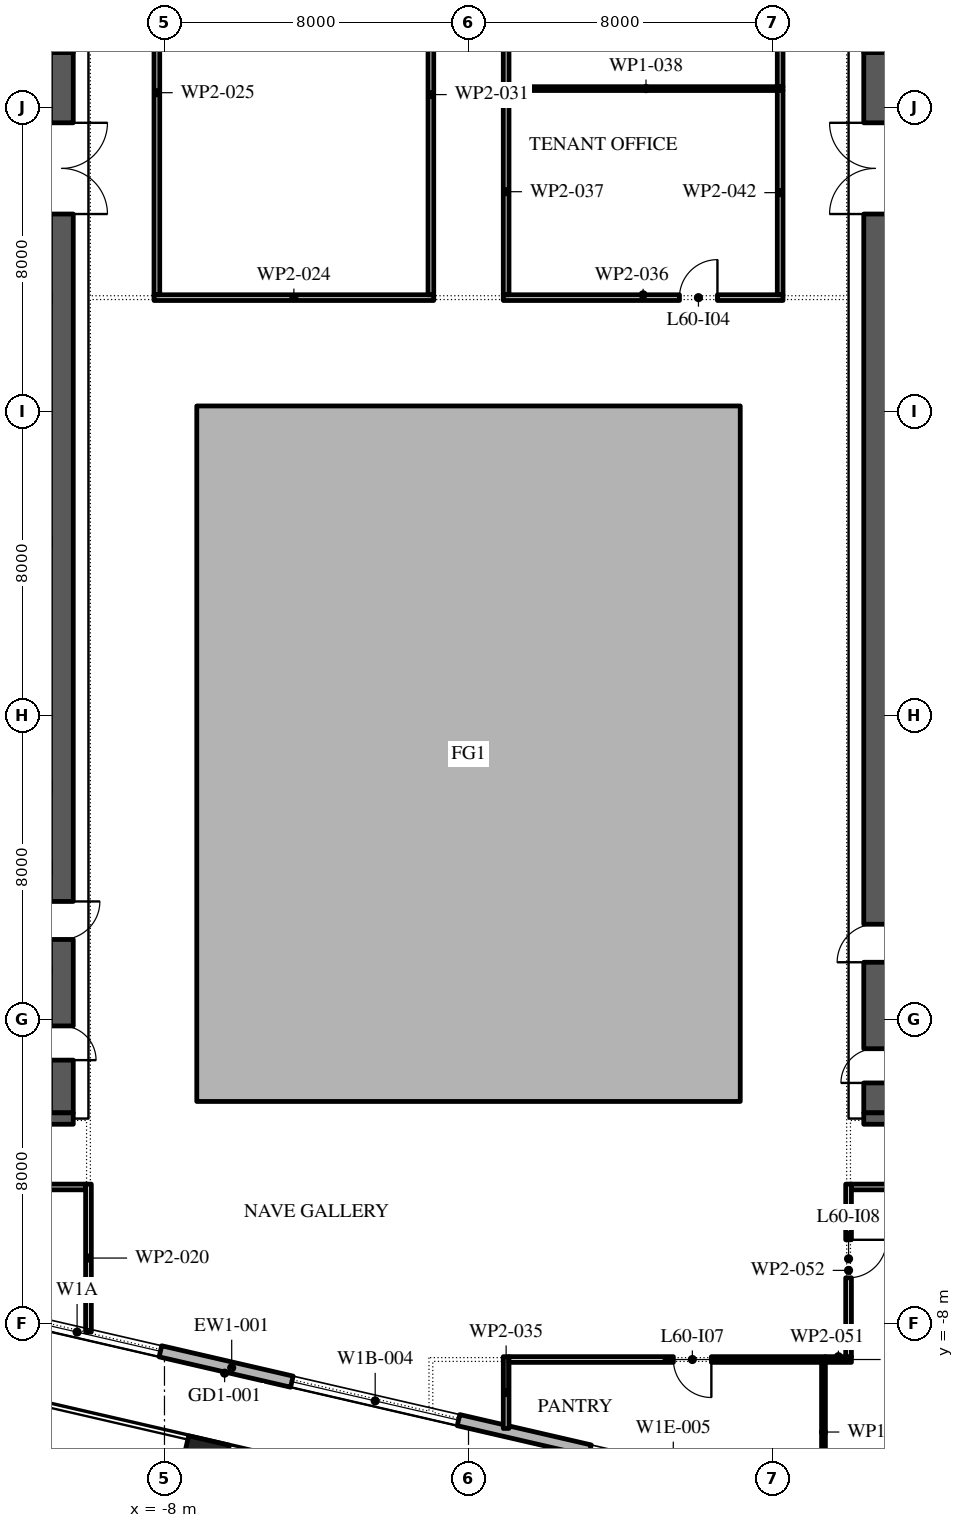
"""IFC4 building model, lengths in metres.
Left out: names, types, materials, properties, quantities, classifications, styles, units other than length and angle.
Written with IfcOpenShell. Run it as: python <this file> out.ifc"""

import sys

from ifc_helpers import new_model, si_unit, direction, frame, frame_2d, origin, origin_2d, place, context, subcontext, project, spatial, polyline, rectangle, outline, extrude, element, fill, save


model = new_model("IFC4")
c1 = context("Model", 3, precision=1e-05, world=origin(), true_north=direction((0.0, 1.0)))
c2 = subcontext(c1, "Body", "Model", "MODEL_VIEW")
j1 = project(units=[si_unit("LENGTHUNIT", "METRE"), si_unit("PLANEANGLEUNIT", "RADIAN")], contexts=[c1])
p1 = place(None, origin())
s1 = spatial("IfcSite", under=j1, at=p1, CompositionType="ELEMENT")
p2 = place(p1, origin())
s2 = spatial("IfcBuilding", under=s1, at=p2, CompositionType="ELEMENT")
p3 = place(p2, frame((0.0, 0.0, 276.6)))
s3 = spatial("IfcBuildingStorey", under=s2, at=p3, CompositionType="ELEMENT", Elevation=276.6)
p4 = place(p3, frame((-6.951, -11.608, 0.0), z_axis=(0.0, 0.0, 1.0), x_axis=(0.974370064785, -0.224951054344, 0.0)))
e1 = element("IfcColumn", 1, at=p4, inside=s3, PredefinedType="COLUMN", context=c2, shape_type="SweptSolid", body=[
    extrude(rectangle(XDim=1.1, YDim=1.1, at=origin_2d()), origin(), (0.0, 0.0, 1.0), 4.2),
])
p5 = place(p3, origin())
e2 = element("IfcWall", 2, at=p5, inside=s3, PredefinedType="STANDARD", context=c2, shape_type="SweptSolid", body=[
    extrude(outline(polyline([(-7.15, -2.15), (7.15, -2.15), (7.15, 16.15), (-7.15, 16.15), (-7.15, -2.15)]), holes=[polyline([(-7.0, -2.0), (-7.0, 16.0), (7.0, 16.0), (7.0, -2.0), (-7.0, -2.0)])]), origin(), (0.0, 0.0, 1.0), 4.0),
])
p6 = place(p3, frame((-29.616, -3.758, 0.0), z_axis=(0.0, 0.0, 1.0), x_axis=(0.974370532314, -0.224949029246, 0.0)))
e3 = element("IfcWall", 3, at=p6, inside=s3, PredefinedType="STANDARD", context=c2, shape_type="SweptSolid", body=[
    extrude(rectangle(XDim=48.0, YDim=0.3, at=frame_2d((24.0, 0.0))), origin(), (0.0, 0.0, 1.0), 4.0),
])
p7 = place(p6, frame((1.625, 0.0, 0.45)))
e4 = element("IfcOpeningElement", 4, at=p7, cuts=e3, PredefinedType="OPENING", context=c2, shape_type="SweptSolid", body=[
    extrude(rectangle(XDim=4.5, YDim=3.05, at=frame_2d((2.25, 1.525))), frame((0.0, 0.16, 0.0), z_axis=(0.0, -1.0, 0.0), x_axis=(1.0, 0.0, 0.0)), (0.0, 0.0, 1.0), 0.32),
])
p8 = place(p6, frame((10.575, 0.0, 0.0)))
e5 = element("IfcOpeningElement", 5, at=p8, cuts=e3, PredefinedType="OPENING", context=c2, shape_type="SweptSolid", body=[
    extrude(rectangle(XDim=2.4, YDim=3.5, at=frame_2d((1.2, 1.75))), frame((0.0, 0.16, 0.0), z_axis=(0.0, -1.0, 0.0), x_axis=(1.0, 0.0, 0.0)), (0.0, 0.0, 1.0), 0.32),
])
p9 = place(p6, frame((17.575, 0.0, 0.45)))
e6 = element("IfcOpeningElement", 6, at=p9, cuts=e3, PredefinedType="OPENING", context=c2, shape_type="SweptSolid", body=[
    extrude(rectangle(XDim=4.5, YDim=3.0, at=frame_2d((2.25, 1.5))), frame((0.0, 0.16, 0.0), z_axis=(0.0, -1.0, 0.0), x_axis=(1.0, 0.0, 0.0)), (0.0, 0.0, 1.0), 0.32),
])
p10 = place(p6, frame((25.625, 0.0, 0.45)))
e7 = element("IfcOpeningElement", 7, at=p10, cuts=e3, PredefinedType="OPENING", context=c2, shape_type="SweptSolid", body=[
    extrude(rectangle(XDim=4.5, YDim=2.95, at=frame_2d((2.25, 1.475))), frame((0.0, 0.16, 0.0), z_axis=(0.0, -1.0, 0.0), x_axis=(1.0, 0.0, 0.0)), (0.0, 0.0, 1.0), 0.32),
])
p11 = place(p6, frame((33.675, 0.0, 0.45)))
e8 = element("IfcOpeningElement", 8, at=p11, cuts=e3, PredefinedType="OPENING", context=c2, shape_type="SweptSolid", body=[
    extrude(rectangle(XDim=4.5, YDim=2.825, at=frame_2d((2.25, 1.413))), frame((0.0, 0.16, 0.0), z_axis=(0.0, -1.0, 0.0), x_axis=(1.0, 0.0, 0.0)), (0.0, 0.0, 1.0), 0.32),
])
p12 = place(p6, frame((42.175, 0.0, 0.0)))
e9 = element("IfcOpeningElement", 9, at=p12, cuts=e3, PredefinedType="OPENING", context=c2, shape_type="SweptSolid", body=[
    extrude(rectangle(XDim=2.4, YDim=3.5, at=frame_2d((1.2, 1.75))), frame((0.0, 0.16, 0.0), z_axis=(0.0, -1.0, 0.0), x_axis=(1.0, 0.0, 0.0)), (0.0, 0.0, 1.0), 0.32),
])
p13 = place(p3, frame((-10.7, -2.45, 0.0), z_axis=(0.0, 0.0, 1.0), x_axis=(0.0, 1.0, 0.0)))
e10 = element("IfcWall", 10, at=p13, inside=s3, PredefinedType="SHEAR", context=c2, shape_type="SweptSolid", body=[
    extrude(rectangle(XDim=27.9, YDim=0.6, at=frame_2d((13.95, 0.0))), origin(), (0.0, 0.0, 1.0), 4.0),
])
p14 = place(p13, frame((23.65, 0.0, 0.0)))
e11 = element("IfcOpeningElement", 11, at=p14, cuts=e10, PredefinedType="OPENING", context=c2, shape_type="SweptSolid", body=[
    extrude(rectangle(XDim=2.4, YDim=2.1, at=frame_2d((1.2, 1.05))), frame((0.0, 0.31, 0.0), z_axis=(0.0, -1.0, 0.0), x_axis=(1.0, 0.0, 0.0)), (0.0, 0.0, 1.0), 0.62),
])
p15 = place(p13, frame((1.387, 0.0, 0.0)))
e12 = element("IfcOpeningElement", 12, at=p15, cuts=e10, PredefinedType="OPENING", context=c2, shape_type="SweptSolid", body=[
    extrude(rectangle(XDim=0.9, YDim=2.1, at=frame_2d((0.45, 1.05))), frame((0.0, 0.31, 0.0), z_axis=(0.0, -1.0, 0.0), x_axis=(1.0, 0.0, 0.0)), (0.0, 0.0, 1.0), 0.62),
])
p16 = place(p13, frame((4.562, 0.0, 0.0)))
e13 = element("IfcOpeningElement", 13, at=p16, cuts=e10, PredefinedType="OPENING", context=c2, shape_type="SweptSolid", body=[
    extrude(rectangle(XDim=1.0, YDim=2.1, at=frame_2d((0.5, 1.05))), frame((0.0, 0.31, 0.0), z_axis=(0.0, -1.0, 0.0), x_axis=(1.0, 0.0, 0.0)), (0.0, 0.0, 1.0), 0.62),
])
p17 = place(p3, frame((-21.6, -2.6, 0.0), z_axis=(0.0, 0.0, 1.0), x_axis=(1.0, 0.0, 0.0)))
e14 = element("IfcWall", 14, at=p17, inside=s3, PredefinedType="SHEAR", context=c2, shape_type="SweptSolid", body=[
    extrude(rectangle(XDim=11.2, YDim=0.3, at=frame_2d((5.6, 0.0))), origin(), (0.0, 0.0, 1.0), 4.0),
])
p18 = place(p3, frame((10.7, -2.45, 0.0), z_axis=(0.0, 0.0, 1.0), x_axis=(0.0, 1.0, 0.0)))
e15 = element("IfcWall", 15, at=p18, inside=s3, PredefinedType="SHEAR", context=c2, shape_type="SweptSolid", body=[
    extrude(rectangle(XDim=27.9, YDim=0.6, at=frame_2d((13.95, 0.0))), origin(), (0.0, 0.0, 1.0), 4.0),
])
p19 = place(p18, frame((23.65, 0.0, 0.0)))
e16 = element("IfcOpeningElement", 16, at=p19, cuts=e15, PredefinedType="OPENING", context=c2, shape_type="SweptSolid", body=[
    extrude(rectangle(XDim=2.4, YDim=2.1, at=frame_2d((1.2, 1.05))), frame((0.0, 0.31, 0.0), z_axis=(0.0, -1.0, 0.0), x_axis=(1.0, 0.0, 0.0)), (0.0, 0.0, 1.0), 0.62),
])
p20 = place(p18, frame((0.788, 0.0, 0.0)))
e17 = element("IfcOpeningElement", 17, at=p20, cuts=e15, PredefinedType="OPENING", context=c2, shape_type="SweptSolid", body=[
    extrude(rectangle(XDim=0.9, YDim=2.1, at=frame_2d((0.45, 1.05))), frame((0.0, 0.31, 0.0), z_axis=(0.0, -1.0, 0.0), x_axis=(1.0, 0.0, 0.0)), (0.0, 0.0, 1.0), 0.62),
])
p21 = place(p18, frame((3.962, 0.0, 0.0)))
e18 = element("IfcOpeningElement", 18, at=p21, cuts=e15, PredefinedType="OPENING", context=c2, shape_type="SweptSolid", body=[
    extrude(rectangle(XDim=1.0, YDim=2.1, at=frame_2d((0.5, 1.05))), frame((0.0, 0.31, 0.0), z_axis=(0.0, -1.0, 0.0), x_axis=(1.0, 0.0, 0.0)), (0.0, 0.0, 1.0), 0.62),
])
p22 = place(p3, frame((10.4, -2.6, 0.0), z_axis=(0.0, 0.0, 1.0), x_axis=(1.0, 0.0, 0.0)))
e19 = element("IfcWall", 19, at=p22, inside=s3, PredefinedType="SHEAR", context=c2, shape_type="SweptSolid", body=[
    extrude(rectangle(XDim=11.2, YDim=0.3, at=frame_2d((5.6, 0.0))), origin(), (0.0, 0.0, 1.0), 4.0),
])
p23 = place(p3, frame((-10.0, -8.216, 0.0), z_axis=(0.0, 0.0, 1.0), x_axis=(0.0, 1.0, 0.0)))
e20 = element("IfcWall", 20, at=p23, inside=s3, PredefinedType="PARTITIONING", context=c2, shape_type="SweptSolid", body=[
    extrude(rectangle(XDim=3.891, YDim=0.15, at=frame_2d((1.946, 0.0))), origin(), (0.0, 0.0, 1.0), 4.0),
])
p24 = place(p3, frame((-10.075, -4.4, 0.0), z_axis=(0.0, 0.0, 1.0), x_axis=(-1.0, 0.0, 0.0)))
e21 = element("IfcWall", 21, at=p24, inside=s3, PredefinedType="PARTITIONING", context=c2, shape_type="SweptSolid", body=[
    extrude(rectangle(XDim=13.64, YDim=0.15, at=frame_2d((6.82, 0.0))), origin(), (0.0, 0.0, 1.0), 4.0),
])
p25 = place(p24, frame((9.065, 0.0, 0.0)))
e22 = element("IfcOpeningElement", 22, at=p25, cuts=e21, PredefinedType="OPENING", context=c2, shape_type="SweptSolid", body=[
    extrude(rectangle(XDim=1.0, YDim=2.1, at=frame_2d((0.5, 1.05))), frame((0.0, 0.085, 0.0), z_axis=(0.0, -1.0, 0.0), x_axis=(1.0, 0.0, 0.0)), (0.0, 0.0, 1.0), 0.17),
])
p26 = place(p3, frame((-8.275, 19.0, 0.0), z_axis=(0.0, 0.0, 1.0), x_axis=(1.0, 0.0, 0.0)))
e23 = element("IfcWall", 23, at=p26, inside=s3, PredefinedType="PARTITIONING", context=c2, shape_type="SweptSolid", body=[
    extrude(rectangle(XDim=7.36, YDim=0.15, at=frame_2d((3.68, 0.0))), origin(), (0.0, 0.0, 1.0), 4.0),
])
p27 = place(p3, frame((-8.2, 29.71, 0.0), z_axis=(0.0, 0.0, 1.0), x_axis=(0.0, -1.0, 0.0)))
e24 = element("IfcWall", 24, at=p27, inside=s3, PredefinedType="PARTITIONING", context=c2, shape_type="SweptSolid", body=[
    extrude(rectangle(XDim=10.635, YDim=0.15, at=frame_2d((5.317, 0.0))), origin(), (0.0, 0.0, 1.0), 4.0),
])
p28 = place(p27, frame((2.81, 0.0, 0.0)))
e25 = element("IfcOpeningElement", 25, at=p28, cuts=e24, PredefinedType="OPENING", context=c2, shape_type="SweptSolid", body=[
    extrude(rectangle(XDim=1.0, YDim=2.1, at=frame_2d((0.5, 1.05))), frame((0.0, 0.085, 0.0), z_axis=(0.0, -1.0, 0.0), x_axis=(1.0, 0.0, 0.0)), (0.0, 0.0, 1.0), 0.17),
])
p29 = place(p3, frame((-0.99, 19.075, 0.0), z_axis=(0.0, 0.0, 1.0), x_axis=(0.0, 1.0, 0.0)))
e26 = element("IfcWall", 26, at=p29, inside=s3, PredefinedType="PARTITIONING", context=c2, shape_type="SweptSolid", body=[
    extrude(rectangle(XDim=10.535, YDim=0.15, at=frame_2d((5.268, 0.0))), origin(), (0.0, 0.0, 1.0), 4.0),
])
p30 = place(p3, frame((0.99, -8.865, 0.0), z_axis=(0.0, 0.0, 1.0), x_axis=(0.0, -1.0, 0.0)))
e27 = element("IfcWall", 27, at=p30, inside=s3, PredefinedType="PARTITIONING", context=c2, shape_type="SweptSolid", body=[
    extrude(rectangle(XDim=1.888, YDim=0.15, at=frame_2d((0.944, 0.0))), origin(), (0.0, 0.0, 1.0), 4.0),
])
p31 = place(p3, frame((0.915, 19.0, 0.0), z_axis=(0.0, 0.0, 1.0), x_axis=(1.0, 0.0, 0.0)))
e28 = element("IfcWall", 28, at=p31, inside=s3, PredefinedType="PARTITIONING", context=c2, shape_type="SweptSolid", body=[
    extrude(rectangle(XDim=7.36, YDim=0.15, at=frame_2d((3.68, 0.0))), origin(), (0.0, 0.0, 1.0), 4.0),
])
p32 = place(p31, frame((4.635, 0.0, 0.0)))
e29 = element("IfcOpeningElement", 29, at=p32, cuts=e28, PredefinedType="OPENING", context=c2, shape_type="SweptSolid", body=[
    extrude(rectangle(XDim=1.0, YDim=2.1, at=frame_2d((0.5, 1.05))), frame((0.0, 0.085, 0.0), z_axis=(0.0, -1.0, 0.0), x_axis=(1.0, 0.0, 0.0)), (0.0, 0.0, 1.0), 0.17),
])
p33 = place(p3, frame((0.99, 24.5, 0.0), z_axis=(0.0, 0.0, 1.0), x_axis=(0.0, -1.0, 0.0)))
e30 = element("IfcWall", 30, at=p33, inside=s3, PredefinedType="PARTITIONING", context=c2, shape_type="SweptSolid", body=[
    extrude(rectangle(XDim=5.425, YDim=0.15, at=frame_2d((2.712, 0.0))), origin(), (0.0, 0.0, 1.0), 4.0),
])
p34 = place(p3, frame((1.065, 24.5, 0.0), z_axis=(0.0, 0.0, 1.0), x_axis=(1.0, 0.0, 0.0)))
e31 = element("IfcWall", 31, at=p34, inside=s3, PredefinedType="PARTITIONING", context=c2, shape_type="SweptSolid", body=[
    extrude(rectangle(XDim=7.21, YDim=0.1, at=frame_2d((3.605, 0.0))), origin(), (0.0, 0.0, 1.0), 4.0),
])
p35 = place(p3, frame((0.99, 35.12, 0.0), z_axis=(0.0, 0.0, 1.0), x_axis=(0.0, -1.0, 0.0)))
e32 = element("IfcWall", 32, at=p35, inside=s3, PredefinedType="PARTITIONING", context=c2, shape_type="SweptSolid", body=[
    extrude(rectangle(XDim=10.62, YDim=0.15, at=frame_2d((5.31, 0.0))), origin(), (0.0, 0.0, 1.0), 4.0),
])
p36 = place(p35, frame((4.72, 0.0, 0.0)))
e33 = element("IfcOpeningElement", 33, at=p36, cuts=e32, PredefinedType="OPENING", context=c2, shape_type="SweptSolid", body=[
    extrude(rectangle(XDim=1.0, YDim=2.1, at=frame_2d((0.5, 1.05))), frame((0.0, 0.085, 0.0), z_axis=(0.0, -1.0, 0.0), x_axis=(1.0, 0.0, 0.0)), (0.0, 0.0, 1.0), 0.17),
])
p37 = place(p3, frame((8.2, 19.075, 0.0), z_axis=(0.0, 0.0, 1.0), x_axis=(0.0, 1.0, 0.0)))
e34 = element("IfcWall", 34, at=p37, inside=s3, PredefinedType="PARTITIONING", context=c2, shape_type="SweptSolid", body=[
    extrude(rectangle(XDim=5.375, YDim=0.15, at=frame_2d((2.688, 0.0))), origin(), (0.0, 0.0, 1.0), 4.0),
])
p38 = place(p3, frame((8.2, 24.55, 0.0), z_axis=(0.0, 0.0, 1.0), x_axis=(0.0, 1.0, 0.0)))
e35 = element("IfcWall", 35, at=p38, inside=s3, PredefinedType="PARTITIONING", context=c2, shape_type="SweptSolid", body=[
    extrude(rectangle(XDim=8.025, YDim=0.15, at=frame_2d((4.012, 0.0))), origin(), (0.0, 0.0, 1.0), 4.0),
])
p39 = place(p3, frame((9.39, -8.94, 0.0), z_axis=(0.0, 0.0, 1.0), x_axis=(-1.0, 0.0, 0.0)))
e36 = element("IfcWall", 36, at=p39, inside=s3, PredefinedType="PARTITIONING", context=c2, shape_type="SweptSolid", body=[
    extrude(rectangle(XDim=8.325, YDim=0.15, at=frame_2d((4.163, 0.0))), origin(), (0.0, 0.0, 1.0), 4.0),
])
p40 = place(p39, frame((3.0, 0.0, 0.0)))
e37 = element("IfcOpeningElement", 37, at=p40, cuts=e36, PredefinedType="OPENING", context=c2, shape_type="SweptSolid", body=[
    extrude(rectangle(XDim=1.0, YDim=2.1, at=frame_2d((0.5, 1.05))), frame((0.0, 0.085, 0.0), z_axis=(0.0, -1.0, 0.0), x_axis=(1.0, 0.0, 0.0)), (0.0, 0.0, 1.0), 0.17),
])
p41 = place(p3, frame((9.34, -9.015, 0.0), z_axis=(0.0, 0.0, 1.0), x_axis=(0.0, -1.0, 0.0)))
e38 = element("IfcWall", 38, at=p41, inside=s3, PredefinedType="PARTITIONING", context=c2, shape_type="SweptSolid", body=[
    extrude(rectangle(XDim=3.666, YDim=0.1, at=frame_2d((1.833, 0.0))), origin(), (0.0, 0.0, 1.0), 4.0),
])
p42 = place(p3, frame((10.075, -8.94, 0.0), z_axis=(0.0, 0.0, 1.0), x_axis=(-1.0, 0.0, 0.0)))
e39 = element("IfcWall", 39, at=p42, inside=s3, PredefinedType="PARTITIONING", context=c2, shape_type="SweptSolid", body=[
    extrude(rectangle(XDim=0.685, YDim=0.15, at=frame_2d((0.343, 0.0))), origin(), (0.0, 0.0, 1.0), 4.0),
])
p43 = place(p3, frame((10.0, -4.325, 0.0), z_axis=(0.0, 0.0, 1.0), x_axis=(0.0, -1.0, 0.0)))
e40 = element("IfcWall", 40, at=p43, inside=s3, PredefinedType="PARTITIONING", context=c2, shape_type="SweptSolid", body=[
    extrude(rectangle(XDim=4.54, YDim=0.15, at=frame_2d((2.27, 0.0))), origin(), (0.0, 0.0, 1.0), 4.0),
])
p44 = place(p43, frame((1.465, 0.0, 0.0)))
e41 = element("IfcOpeningElement", 41, at=p44, cuts=e40, PredefinedType="OPENING", context=c2, shape_type="SweptSolid", body=[
    extrude(rectangle(XDim=1.0, YDim=2.1, at=frame_2d((0.5, 1.05))), frame((0.0, 0.085, 0.0), z_axis=(0.0, -1.0, 0.0), x_axis=(1.0, 0.0, 0.0)), (0.0, 0.0, 1.0), 0.17),
])
p45 = place(p3, frame((14.19, -4.4, 0.0), z_axis=(0.0, 0.0, 1.0), x_axis=(-1.0, 0.0, 0.0)))
e42 = element("IfcWall", 42, at=p45, inside=s3, PredefinedType="PARTITIONING", context=c2, shape_type="SweptSolid", body=[
    extrude(rectangle(XDim=4.115, YDim=0.15, at=frame_2d((2.058, 0.0))), origin(), (0.0, 0.0, 1.0), 4.0),
])
p46 = place(p9, origin())
e43 = element("IfcWindow", 43, at=p46, inside=s3, PartitioningType="DOUBLE_PANEL_VERTICAL", PredefinedType="WINDOW", context=c2, shape_type="SweptSolid", body=[
    extrude(rectangle(XDim=4.5, YDim=3.0, at=frame_2d((2.25, 1.5))), frame((0.0, 0.03, 0.0), z_axis=(0.0, -1.0, 0.0), x_axis=(1.0, 0.0, 0.0)), (0.0, 0.0, 1.0), 0.06),
])
fill(e6, e43)
p47 = place(p10, origin())
e44 = element("IfcWindow", 44, at=p47, inside=s3, PartitioningType="DOUBLE_PANEL_VERTICAL", PredefinedType="WINDOW", context=c2, shape_type="SweptSolid", body=[
    extrude(rectangle(XDim=4.5, YDim=2.95, at=frame_2d((2.25, 1.475))), frame((0.0, 0.03, 0.0), z_axis=(0.0, -1.0, 0.0), x_axis=(1.0, 0.0, 0.0)), (0.0, 0.0, 1.0), 0.06),
])
fill(e7, e44)
p48 = place(p14, frame((2.4, 0.0, 0.0), z_axis=(0.0, 0.0, 1.0), x_axis=(-1.0, 0.0, 0.0)))
e45 = element("IfcDoor", 45, at=p48, inside=s3, OperationType="DOUBLE_DOOR_SINGLE_SWING", PredefinedType="DOOR", context=c2, shape_type="SweptSolid", body=[
    extrude(rectangle(XDim=2.4, YDim=2.1, at=frame_2d((1.2, 1.05))), frame((0.0, 0.025, 0.0), z_axis=(0.0, -1.0, 0.0), x_axis=(1.0, 0.0, 0.0)), (0.0, 0.0, 1.0), 0.05),
])
fill(e11, e45)
p49 = place(p19, origin())
e46 = element("IfcDoor", 46, at=p49, inside=s3, OperationType="DOUBLE_DOOR_SINGLE_SWING", PredefinedType="DOOR", context=c2, shape_type="SweptSolid", body=[
    extrude(rectangle(XDim=2.4, YDim=2.1, at=frame_2d((1.2, 1.05))), frame((0.0, 0.025, 0.0), z_axis=(0.0, -1.0, 0.0), x_axis=(1.0, 0.0, 0.0)), (0.0, 0.0, 1.0), 0.05),
])
fill(e16, e46)
p50 = place(p32, origin())
e47 = element("IfcDoor", 47, at=p50, inside=s3, OperationType="SINGLE_SWING_LEFT", PredefinedType="DOOR", context=c2, shape_type="SweptSolid", body=[
    extrude(rectangle(XDim=1.0, YDim=2.1, at=frame_2d((0.5, 1.05))), frame((0.0, 0.025, 0.0), z_axis=(0.0, -1.0, 0.0), x_axis=(1.0, 0.0, 0.0)), (0.0, 0.0, 1.0), 0.05),
])
fill(e29, e47)
p51 = place(p40, origin())
e48 = element("IfcDoor", 48, at=p51, inside=s3, OperationType="SINGLE_SWING_RIGHT", PredefinedType="DOOR", context=c2, shape_type="SweptSolid", body=[
    extrude(rectangle(XDim=1.0, YDim=2.1, at=frame_2d((0.5, 1.05))), frame((0.0, 0.025, 0.0), z_axis=(0.0, -1.0, 0.0), x_axis=(1.0, 0.0, 0.0)), (0.0, 0.0, 1.0), 0.05),
])
fill(e37, e48)
p52 = place(p44, origin())
e49 = element("IfcDoor", 49, at=p52, inside=s3, OperationType="SINGLE_SWING_RIGHT", PredefinedType="DOOR", context=c2, shape_type="SweptSolid", body=[
    extrude(rectangle(XDim=1.0, YDim=2.1, at=frame_2d((0.5, 1.05))), frame((0.0, 0.025, 0.0), z_axis=(0.0, -1.0, 0.0), x_axis=(1.0, 0.0, 0.0)), (0.0, 0.0, 1.0), 0.05),
])
fill(e41, e49)
save(model, sys.argv[1])
